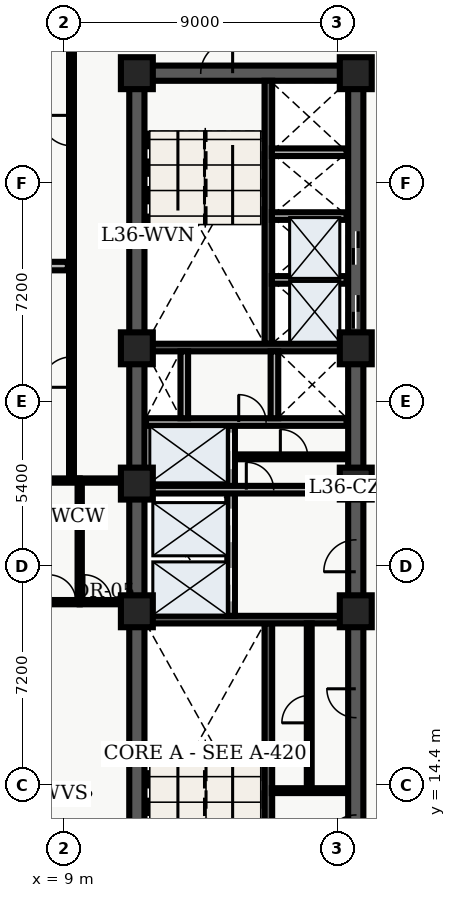
"""IFC4 building model, lengths in metres.
Left out: names, types, materials, properties, quantities, classifications, styles, units other than length and angle.
Written with IfcOpenShell. Run it as: python <this file> out.ifc"""

import sys

from ifc_helpers import new_model, entity, si_unit, converted_unit, direction, frame, origin_with_axes, origin_2d_with_axis, place, context, subcontext, project, spatial, polyline, rectangle, outline, extrude, element, fill, save


model = new_model("IFC4")
c1 = context("Model", 3, precision=1e-05, world=origin_with_axes(), true_north=direction((0.0, 1.0)))
c2 = subcontext(c1, "Body", "Model", "MODEL_VIEW")
j1 = project(units=[si_unit("LENGTHUNIT", "METRE"), converted_unit("PLANEANGLEUNIT", "DEGREE", entity("IfcPlaneAngleMeasure", 0.017), si_unit("PLANEANGLEUNIT", "RADIAN"), dimensions=[0, 0, 0, 0, 0, 0, 0])], contexts=[c1])
p1 = place(None, origin_with_axes())
s1 = spatial("IfcSite", under=j1, at=p1, CompositionType="ELEMENT")
p2 = place(p1, origin_with_axes())
s2 = spatial("IfcBuilding", under=s1, at=p2, CompositionType="ELEMENT")
p3 = place(p2, frame((0.0, 0.0, 148.5), z_axis=(0.0, 0.0, 1.0), x_axis=(1.0, 0.0, 0.0)))
s3 = spatial("IfcBuildingStorey", under=s2, at=p3, CompositionType="ELEMENT", Elevation=148.5)
p4 = place(p3, frame((11.4, 10.8, 0.0), z_axis=(0.0, 0.0, 1.0), x_axis=(0.0, 1.0, 0.0)))
e1 = element("IfcWall", 1, at=p4, inside=s3, PredefinedType="SHEAR", context=c2, shape_type="SweptSolid", body=[
    extrude(outline(polyline([(0.0, -0.25), (27.0, -0.25), (27.0, 0.25), (0.0, 0.25), (0.0, -0.25)])), origin_with_axes(), (0.0, 0.0, 1.0), 3.66),
])
p5 = place(p3, frame((11.4, 37.8, 0.0), z_axis=(0.0, 0.0, 1.0), x_axis=(1.0, 0.0, 0.0)))
e2 = element("IfcWall", 2, at=p5, inside=s3, PredefinedType="SHEAR", context=c2, shape_type="SweptSolid", body=[
    extrude(outline(polyline([(0.0, -0.25), (7.2, -0.25), (7.2, 0.25), (0.0, 0.25), (0.0, -0.25)])), origin_with_axes(), (0.0, 0.0, 1.0), 3.66),
])
p6 = place(p5, frame((2.625, 0.0, 0.0), z_axis=(0.0, 0.0, 1.0), x_axis=(1.0, 0.0, 0.0)))
e3 = element("IfcOpeningElement", 3, at=p6, cuts=e2, PredefinedType="OPENING", context=c2, shape_type="SweptSolid", body=[
    extrude(rectangle(XDim=1.05, YDim=0.52, at=origin_2d_with_axis()), origin_with_axes(), (0.0, 0.0, 1.0), 2.15),
])
p7 = place(p3, frame((18.6, 10.8, 0.0), z_axis=(0.0, 0.0, 1.0), x_axis=(0.0, 1.0, 0.0)))
e4 = element("IfcWall", 4, at=p7, inside=s3, PredefinedType="SHEAR", context=c2, shape_type="SweptSolid", body=[
    extrude(outline(polyline([(0.0, -0.25), (13.5, -0.25), (13.5, 0.25), (0.0, 0.25), (0.0, -0.25)])), origin_with_axes(), (0.0, 0.0, 1.0), 3.66),
])
p8 = place(p7, frame((11.125, 0.0, 0.0), z_axis=(0.0, 0.0, 1.0), x_axis=(1.0, 0.0, 0.0)))
e5 = element("IfcOpeningElement", 5, at=p8, cuts=e4, PredefinedType="OPENING", context=c2, shape_type="SweptSolid", body=[
    extrude(rectangle(XDim=1.05, YDim=0.52, at=origin_2d_with_axis()), origin_with_axes(), (0.0, 0.0, 1.0), 2.15),
])
p9 = place(p7, frame((2.125, 0.0, 0.0), z_axis=(0.0, 0.0, 1.0), x_axis=(1.0, 0.0, 0.0)))
e6 = element("IfcOpeningElement", 6, at=p9, cuts=e4, PredefinedType="OPENING", context=c2, shape_type="SweptSolid", body=[
    extrude(rectangle(XDim=0.95, YDim=0.52, at=origin_2d_with_axis()), origin_with_axes(), (0.0, 0.0, 1.0), 2.15),
])
p10 = place(p7, frame((6.275, 0.0, 0.0), z_axis=(0.0, 0.0, 1.0), x_axis=(1.0, 0.0, 0.0)))
e7 = element("IfcOpeningElement", 7, at=p10, cuts=e4, PredefinedType="OPENING", context=c2, shape_type="SweptSolid", body=[
    extrude(rectangle(XDim=0.95, YDim=0.52, at=origin_2d_with_axis()), origin_with_axes(), (0.0, 0.0, 1.0), 2.15),
])
p11 = place(p3, frame((18.6, 24.3, 0.0), z_axis=(0.0, 0.0, 1.0), x_axis=(0.0, 1.0, 0.0)))
e8 = element("IfcWall", 8, at=p11, inside=s3, PredefinedType="SHEAR", context=c2, shape_type="SweptSolid", body=[
    extrude(outline(polyline([(0.0, -0.25), (13.5, -0.25), (13.5, 0.25), (0.0, 0.25), (0.0, -0.25)])), origin_with_axes(), (0.0, 0.0, 1.0), 3.66),
])
p12 = place(p11, frame((5.65, 0.0, 0.0), z_axis=(0.0, 0.0, 1.0), x_axis=(1.0, 0.0, 0.0)))
e9 = element("IfcOpeningElement", 9, at=p12, cuts=e8, PredefinedType="OPENING", context=c2, shape_type="SweptSolid", body=[
    extrude(rectangle(XDim=1.1, YDim=0.52, at=origin_2d_with_axis()), origin_with_axes(), (0.0, 0.0, 1.0), 2.15),
])
p13 = place(p11, frame((7.75, 0.0, 0.0), z_axis=(0.0, 0.0, 1.0), x_axis=(1.0, 0.0, 0.0)))
e10 = element("IfcOpeningElement", 10, at=p13, cuts=e8, PredefinedType="OPENING", context=c2, shape_type="SweptSolid", body=[
    extrude(rectangle(XDim=1.1, YDim=0.52, at=origin_2d_with_axis()), origin_with_axes(), (0.0, 0.0, 1.0), 2.15),
])
p14 = place(p3, frame((15.725, 11.05, 0.0), z_axis=(0.0, 0.0, 1.0), x_axis=(0.0, 1.0, 0.0)))
e11 = element("IfcWall", 11, at=p14, inside=s3, PredefinedType="SHEAR", context=c2, shape_type="SweptSolid", body=[
    extrude(outline(polyline([(0.0, -0.125), (8.65, -0.125), (8.65, 0.125), (0.0, 0.125), (0.0, -0.125)])), origin_with_axes(), (0.0, 0.0, 1.0), 3.66),
])
p15 = place(p3, frame((11.65, 19.825, 0.0), z_axis=(0.0, 0.0, 1.0), x_axis=(1.0, 0.0, 0.0)))
e12 = element("IfcWall", 12, at=p15, inside=s3, PredefinedType="SHEAR", context=c2, shape_type="SweptSolid", body=[
    extrude(outline(polyline([(0.0, -0.125), (6.7, -0.125), (6.7, 0.125), (0.0, 0.125), (0.0, -0.125)])), origin_with_axes(), (0.0, 0.0, 1.0), 3.66),
])
p16 = place(p3, frame((15.725, 28.9, 0.0), z_axis=(0.0, 0.0, 1.0), x_axis=(0.0, 1.0, 0.0)))
e13 = element("IfcWall", 13, at=p16, inside=s3, PredefinedType="SHEAR", context=c2, shape_type="SweptSolid", body=[
    extrude(outline(polyline([(0.0, -0.125), (8.65, -0.125), (8.65, 0.125), (0.0, 0.125), (0.0, -0.125)])), origin_with_axes(), (0.0, 0.0, 1.0), 3.66),
])
p17 = place(p3, frame((11.65, 28.775, 0.0), z_axis=(0.0, 0.0, 1.0), x_axis=(1.0, 0.0, 0.0)))
e14 = element("IfcWall", 14, at=p17, inside=s3, PredefinedType="SHEAR", context=c2, shape_type="SweptSolid", body=[
    extrude(outline(polyline([(0.0, -0.125), (6.7, -0.125), (6.7, 0.125), (0.0, 0.125), (0.0, -0.125)])), origin_with_axes(), (0.0, 0.0, 1.0), 3.66),
])
p18 = place(p3, frame((14.5, 19.95, 0.0), z_axis=(0.0, 0.0, 1.0), x_axis=(0.0, 1.0, 0.0)))
e15 = element("IfcWall", 15, at=p18, inside=s3, PredefinedType="SOLIDWALL", context=c2, shape_type="SweptSolid", body=[
    extrude(outline(polyline([(0.0, -0.125), (6.25, -0.125), (6.25, 0.125), (0.0, 0.125), (0.0, -0.125)])), origin_with_axes(), (0.0, 0.0, 1.0), 2.7),
])
p19 = place(p18, frame((1.025, 0.0, 0.0), z_axis=(0.0, 0.0, 1.0), x_axis=(1.0, 0.0, 0.0)))
e16 = element("IfcOpeningElement", 16, at=p19, cuts=e15, PredefinedType="OPENING", context=c2, shape_type="SweptSolid", body=[
    extrude(rectangle(XDim=1.1, YDim=0.27, at=origin_2d_with_axis()), origin_with_axes(), (0.0, 0.0, 1.0), 2.15),
])
p20 = place(p18, frame((2.975, 0.0, 0.0), z_axis=(0.0, 0.0, 1.0), x_axis=(1.0, 0.0, 0.0)))
e17 = element("IfcOpeningElement", 17, at=p20, cuts=e15, PredefinedType="OPENING", context=c2, shape_type="SweptSolid", body=[
    extrude(rectangle(XDim=1.1, YDim=0.27, at=origin_2d_with_axis()), origin_with_axes(), (0.0, 0.0, 1.0), 2.15),
])
p21 = place(p18, frame((5.425, 0.0, 0.0), z_axis=(0.0, 0.0, 1.0), x_axis=(1.0, 0.0, 0.0)))
e18 = element("IfcOpeningElement", 18, at=p21, cuts=e15, PredefinedType="OPENING", context=c2, shape_type="SweptSolid", body=[
    extrude(rectangle(XDim=1.2, YDim=0.27, at=origin_2d_with_axis()), origin_with_axes(), (0.0, 0.0, 1.0), 2.15),
])
p22 = place(p3, frame((11.7, 24.1, 0.0), z_axis=(0.0, 0.0, 1.0), x_axis=(1.0, 0.0, 0.0)))
e19 = element("IfcWall", 19, at=p22, inside=s3, PredefinedType="SOLIDWALL", context=c2, shape_type="SweptSolid", body=[
    extrude(outline(polyline([(0.0, -0.125), (6.6, -0.125), (6.6, 0.125), (0.0, 0.125), (0.0, -0.125)])), origin_with_axes(), (0.0, 0.0, 1.0), 2.7),
])
p23 = place(p22, frame((3.75, 0.0, 0.0), z_axis=(0.0, 0.0, 1.0), x_axis=(1.0, 0.0, 0.0)))
e20 = element("IfcOpeningElement", 20, at=p23, cuts=e19, PredefinedType="OPENING", context=c2, shape_type="SweptSolid", body=[
    extrude(rectangle(XDim=0.9, YDim=0.27, at=origin_2d_with_axis()), origin_with_axes(), (0.0, 0.0, 1.0), 2.15),
])
p24 = place(p3, frame((11.7, 26.325, 0.0), z_axis=(0.0, 0.0, 1.0), x_axis=(1.0, 0.0, 0.0)))
e21 = element("IfcWall", 21, at=p24, inside=s3, PredefinedType="SOLIDWALL", context=c2, shape_type="SweptSolid", body=[
    extrude(outline(polyline([(0.0, -0.125), (6.6, -0.125), (6.6, 0.125), (0.0, 0.125), (0.0, -0.125)])), origin_with_axes(), (0.0, 0.0, 1.0), 2.7),
])
p25 = place(p24, frame((3.5, 0.0, 0.0), z_axis=(0.0, 0.0, 1.0), x_axis=(1.0, 0.0, 0.0)))
e22 = element("IfcOpeningElement", 22, at=p25, cuts=e21, PredefinedType="OPENING", context=c2, shape_type="SweptSolid", body=[
    extrude(rectangle(XDim=0.9, YDim=0.27, at=origin_2d_with_axis()), origin_with_axes(), (0.0, 0.0, 1.0), 2.15),
])
for number, where, z_axis, x_axis in (
    (23, (12.96, 26.45, 0.0), (0.0, 0.0, 1.0), (0.0, 1.0, 0.0)),
    (24, (15.925, 26.45, 0.0), (0.0, 0.0, 1.0), (0.0, 1.0, 0.0)),
):
    element("IfcWall", number, at=place(p3, frame(where, z_axis=z_axis, x_axis=x_axis)), inside=s3, PredefinedType="SOLIDWALL", context=c2, shape_type="SweptSolid", body=[
        extrude(outline(polyline([(0.0, -0.125), (2.2, -0.125), (2.2, 0.125), (0.0, 0.125), (0.0, -0.125)])), origin_with_axes(), (0.0, 0.0, 1.0), 2.7),
    ])
for number, where, z_axis, x_axis in (
    (25, (11.4, 20.1, 0.0), (0.0, 0.0, 1.0), (1.0, 0.0, 0.0)),
    (26, (11.4, 24.3, 0.0), (0.0, 0.0, 1.0), (1.0, 0.0, 0.0)),
    (27, (11.4, 28.75, 0.0), (0.0, 0.0, 1.0), (1.0, 0.0, 0.0)),
    (28, (11.4, 37.8, 0.0), (0.0, 0.0, 1.0), (1.0, 0.0, 0.0)),
    (29, (18.6, 20.1, 0.0), (0.0, 0.0, 1.0), (1.0, 0.0, 0.0)),
    (30, (18.6, 24.3, 0.0), (0.0, 0.0, 1.0), (1.0, 0.0, 0.0)),
    (31, (18.6, 28.75, 0.0), (0.0, 0.0, 1.0), (1.0, 0.0, 0.0)),
    (32, (18.6, 37.8, 0.0), (0.0, 0.0, 1.0), (1.0, 0.0, 0.0)),
):
    element("IfcColumn", number, at=place(p3, frame(where, z_axis=z_axis, x_axis=x_axis)), inside=s3, PredefinedType="COLUMN", context=c2, shape_type="SweptSolid", body=[
        extrude(rectangle(XDim=1.05, YDim=1.05, at=origin_2d_with_axis()), origin_with_axes(), (0.0, 0.0, 1.0), 3.9),
    ])
p26 = place(p3, frame((14.62, 25.18, 0.0), z_axis=(0.0, 0.0, 1.0), x_axis=(1.0, 0.0, 0.0)))
e33 = element("IfcWall", 33, at=p26, inside=s3, PredefinedType="PARTITIONING", context=c2, shape_type="SweptSolid", body=[
    extrude(outline(polyline([(0.0, -0.08), (3.68, -0.08), (3.68, 0.08), (0.0, 0.08), (0.0, -0.08)])), origin_with_axes(), (0.0, 0.0, 1.0), 2.7),
])
p27 = place(p26, frame((1.95, 0.0, 0.0), z_axis=(0.0, 0.0, 1.0), x_axis=(1.0, 0.0, 0.0)))
e34 = element("IfcOpeningElement", 34, at=p27, cuts=e33, PredefinedType="OPENING", context=c2, shape_type="SweptSolid", body=[
    extrude(rectangle(XDim=0.9, YDim=0.18, at=origin_2d_with_axis()), origin_with_axes(), (0.0, 0.0, 1.0), 2.15),
])
p28 = place(p3, frame((15.84, 14.2, 0.0), z_axis=(0.0, 0.0, 1.0), x_axis=(1.0, 0.0, 0.0)))
e35 = element("IfcWall", 35, at=p28, inside=s3, PredefinedType="PARTITIONING", context=c2, shape_type="SweptSolid", body=[
    extrude(outline(polyline([(0.0, -0.08), (2.46, -0.08), (2.46, 0.08), (0.0, 0.08), (0.0, -0.08)])), origin_with_axes(), (0.0, 0.0, 1.0), 2.7),
])
p29 = place(p3, frame((17.07, 14.28, 0.0), z_axis=(0.0, 0.0, 1.0), x_axis=(0.0, 1.0, 0.0)))
e36 = element("IfcWall", 36, at=p29, inside=s3, PredefinedType="PARTITIONING", context=c2, shape_type="SweptSolid", body=[
    extrude(outline(polyline([(0.0, -0.08), (5.42, -0.08), (5.42, 0.08), (0.0, 0.08), (0.0, -0.08)])), origin_with_axes(), (0.0, 0.0, 1.0), 2.7),
])
p30 = place(p29, frame((2.6, 0.0, 0.0), z_axis=(0.0, 0.0, 1.0), x_axis=(1.0, 0.0, 0.0)))
e37 = element("IfcOpeningElement", 37, at=p30, cuts=e36, PredefinedType="OPENING", context=c2, shape_type="SweptSolid", body=[
    extrude(rectangle(XDim=0.9, YDim=0.18, at=origin_2d_with_axis()), origin_with_axes(), (0.0, 0.0, 1.0), 2.15),
])
for number, where, z_axis, x_axis in (
    (38, (15.84, 31.0, 0.0), (0.0, 0.0, 1.0), (1.0, 0.0, 0.0)),
    (39, (15.84, 33.1, 0.0), (0.0, 0.0, 1.0), (1.0, 0.0, 0.0)),
    (40, (15.84, 35.2, 0.0), (0.0, 0.0, 1.0), (1.0, 0.0, 0.0)),
):
    element("IfcWall", number, at=place(p3, frame(where, z_axis=z_axis, x_axis=x_axis)), inside=s3, PredefinedType="SOLIDWALL", context=c2, shape_type="SweptSolid", body=[
        extrude(outline(polyline([(0.0, -0.125), (2.46, -0.125), (2.46, 0.125), (0.0, 0.125), (0.0, -0.125)])), origin_with_axes(), (0.0, 0.0, 1.0), 2.7),
    ])
p31 = place(p3, frame((9.52, 20.4, 0.0), z_axis=(0.0, 0.0, 1.0), x_axis=(0.0, 1.0, 0.0)))
e41 = element("IfcWall", 41, at=p31, inside=s3, PredefinedType="PARTITIONING", context=c2, shape_type="SweptSolid", body=[
    extrude(outline(polyline([(0.0, -0.07), (4.0, -0.07), (4.0, 0.07), (0.0, 0.07), (0.0, -0.07)])), origin_with_axes(), (0.0, 0.0, 1.0), 2.7),
])
p32 = place(p3, frame((9.52, 20.4, 0.0), z_axis=(0.0, 0.0, 1.0), x_axis=(1.0, 0.0, 0.0)))
e42 = element("IfcWall", 42, at=p32, inside=s3, PredefinedType="PARTITIONING", context=c2, shape_type="SweptSolid", body=[
    extrude(outline(polyline([(0.0, -0.07), (1.58, -0.07), (1.58, 0.07), (0.0, 0.07), (0.0, -0.07)])), origin_with_axes(), (0.0, 0.0, 1.0), 2.7),
])
p33 = place(p32, frame((0.59, 0.0, 0.0), z_axis=(0.0, 0.0, 1.0), x_axis=(1.0, 0.0, 0.0)))
e43 = element("IfcOpeningElement", 43, at=p33, cuts=e42, PredefinedType="OPENING", context=c2, shape_type="SweptSolid", body=[
    extrude(rectangle(XDim=0.9, YDim=0.16, at=origin_2d_with_axis()), origin_with_axes(), (0.0, 0.0, 1.0), 2.15),
])
p34 = place(p3, frame((9.52, 24.4, 0.0), z_axis=(0.0, 0.0, 1.0), x_axis=(1.0, 0.0, 0.0)))
e44 = element("IfcWall", 44, at=p34, inside=s3, PredefinedType="PARTITIONING", context=c2, shape_type="SweptSolid", body=[
    extrude(outline(polyline([(0.0, -0.07), (1.58, -0.07), (1.58, 0.07), (0.0, 0.07), (0.0, -0.07)])), origin_with_axes(), (0.0, 0.0, 1.0), 2.7),
])
p35 = place(p3, frame((9.25, 24.4, 0.0), z_axis=(0.0, 0.0, 1.0), x_axis=(0.0, 1.0, 0.0)))
e45 = element("IfcWall", 45, at=p35, inside=s3, PredefinedType="PARTITIONING", context=c2, shape_type="SweptSolid", body=[
    extrude(outline(polyline([(0.0, -0.08), (16.1, -0.08), (16.1, 0.08), (0.0, 0.08), (0.0, -0.08)])), origin_with_axes(), (0.0, 0.0, 1.0), 2.7),
])
p36 = place(p35, frame((3.567, 0.0, 0.0), z_axis=(0.0, 0.0, 1.0), x_axis=(1.0, 0.0, 0.0)))
e46 = element("IfcOpeningElement", 46, at=p36, cuts=e45, PredefinedType="OPENING", context=c2, shape_type="SweptSolid", body=[
    extrude(rectangle(XDim=1.0, YDim=0.18, at=origin_2d_with_axis()), origin_with_axes(), (0.0, 0.0, 1.0), 2.15),
])
p37 = place(p35, frame((11.512, 0.0, 0.0), z_axis=(0.0, 0.0, 1.0), x_axis=(1.0, 0.0, 0.0)))
e47 = element("IfcOpeningElement", 47, at=p37, cuts=e45, PredefinedType="OPENING", context=c2, shape_type="SweptSolid", body=[
    extrude(rectangle(XDim=1.0, YDim=0.18, at=origin_2d_with_axis()), origin_with_axes(), (0.0, 0.0, 1.0), 2.15),
])
p38 = place(p3, frame((0.335, 20.4, 0.0), z_axis=(0.0, 0.0, 1.0), x_axis=(1.0, 0.0, 0.0)))
e48 = element("IfcWall", 48, at=p38, inside=s3, PredefinedType="PARTITIONING", context=c2, shape_type="SweptSolid", body=[
    extrude(outline(polyline([(0.0, -0.07), (9.185, -0.07), (9.185, 0.07), (0.0, 0.07), (0.0, -0.07)])), origin_with_axes(), (0.0, 0.0, 1.0), 2.7),
])
p39 = place(p38, frame((8.615, 0.0, 0.0), z_axis=(0.0, 0.0, 1.0), x_axis=(1.0, 0.0, 0.0)))
e49 = element("IfcOpeningElement", 49, at=p39, cuts=e48, PredefinedType="OPENING", context=c2, shape_type="SweptSolid", body=[
    extrude(rectangle(XDim=0.9, YDim=0.16, at=origin_2d_with_axis()), origin_with_axes(), (0.0, 0.0, 1.0), 2.15),
])
p40 = place(p3, frame((0.335, 24.4, 0.0), z_axis=(0.0, 0.0, 1.0), x_axis=(1.0, 0.0, 0.0)))
e50 = element("IfcWall", 50, at=p40, inside=s3, PredefinedType="PARTITIONING", context=c2, shape_type="SweptSolid", body=[
    extrude(outline(polyline([(0.0, -0.07), (9.185, -0.07), (9.185, 0.07), (0.0, 0.07), (0.0, -0.07)])), origin_with_axes(), (0.0, 0.0, 1.0), 2.7),
])
p41 = place(p3, frame((0.335, 31.455, 0.0), z_axis=(0.0, 0.0, 1.0), x_axis=(1.0, 0.0, 0.0)))
e51 = element("IfcWall", 51, at=p41, inside=s3, PredefinedType="PARTITIONING", context=c2, shape_type="SweptSolid", body=[
    extrude(outline(polyline([(0.0, -0.14), (8.795, -0.14), (8.795, 0.14), (0.0, 0.14), (0.0, -0.14)])), origin_with_axes(), (0.0, 0.0, 1.0), 2.7),
])
p42 = place(p11, frame((5.65, 0.0, 0.0), z_axis=(0.0, 0.0, 1.0), x_axis=(1.0, 0.0, 0.0)))
e52 = element("IfcDoor", 52, at=p42, inside=s3, OperationType="SLIDING_TO_LEFT", PredefinedType="DOOR", context=c2, shape_type="SweptSolid", body=[
    extrude(rectangle(XDim=1.1, YDim=0.09, at=origin_2d_with_axis()), origin_with_axes(), (0.0, 0.0, 1.0), 2.15),
])
fill(e9, e52)
p43 = place(p11, frame((7.75, 0.0, 0.0), z_axis=(0.0, 0.0, 1.0), x_axis=(1.0, 0.0, 0.0)))
e53 = element("IfcDoor", 53, at=p43, inside=s3, OperationType="SLIDING_TO_RIGHT", PredefinedType="DOOR", context=c2, shape_type="SweptSolid", body=[
    extrude(rectangle(XDim=1.1, YDim=0.09, at=origin_2d_with_axis()), origin_with_axes(), (0.0, 0.0, 1.0), 2.15),
])
fill(e10, e53)
p44 = place(p18, frame((1.025, 0.0, 0.0), z_axis=(0.0, 0.0, 1.0), x_axis=(1.0, 0.0, 0.0)))
e54 = element("IfcDoor", 54, at=p44, inside=s3, OperationType="SLIDING_TO_LEFT", PredefinedType="DOOR", context=c2, shape_type="SweptSolid", body=[
    extrude(rectangle(XDim=1.1, YDim=0.09, at=origin_2d_with_axis()), origin_with_axes(), (0.0, 0.0, 1.0), 2.15),
])
fill(e16, e54)
p45 = place(p18, frame((2.975, 0.0, 0.0), z_axis=(0.0, 0.0, 1.0), x_axis=(1.0, 0.0, 0.0)))
e55 = element("IfcDoor", 55, at=p45, inside=s3, OperationType="SLIDING_TO_RIGHT", PredefinedType="DOOR", context=c2, shape_type="SweptSolid", body=[
    extrude(rectangle(XDim=1.1, YDim=0.09, at=origin_2d_with_axis()), origin_with_axes(), (0.0, 0.0, 1.0), 2.15),
])
fill(e17, e55)
p46 = place(p18, frame((5.425, 0.0, 0.0), z_axis=(0.0, 0.0, 1.0), x_axis=(1.0, 0.0, 0.0)))
e56 = element("IfcDoor", 56, at=p46, inside=s3, OperationType="DOUBLE_DOOR_SLIDING", PredefinedType="DOOR", context=c2, shape_type="SweptSolid", body=[
    extrude(rectangle(XDim=1.2, YDim=0.09, at=origin_2d_with_axis()), origin_with_axes(), (0.0, 0.0, 1.0), 2.15),
])
fill(e18, e56)
p47 = place(p5, frame((2.625, 0.0, 0.0), z_axis=(0.0, 0.0, 1.0), x_axis=(1.0, 0.0, 0.0)))
e57 = element("IfcDoor", 57, at=p47, inside=s3, OperationType="SINGLE_SWING_RIGHT", PredefinedType="DOOR", context=c2, shape_type="SweptSolid", body=[
    extrude(rectangle(XDim=1.05, YDim=0.09, at=origin_2d_with_axis()), origin_with_axes(), (0.0, 0.0, 1.0), 2.15),
])
fill(e3, e57)
p48 = place(p7, frame((11.125, 0.0, 0.0), z_axis=(0.0, 0.0, 1.0), x_axis=(1.0, 0.0, 0.0)))
e58 = element("IfcDoor", 58, at=p48, inside=s3, OperationType="SINGLE_SWING_LEFT", PredefinedType="DOOR", context=c2, shape_type="SweptSolid", body=[
    extrude(rectangle(XDim=1.05, YDim=0.09, at=origin_2d_with_axis()), origin_with_axes(), (0.0, 0.0, 1.0), 2.15),
])
fill(e5, e58)
p49 = place(p24, frame((3.5, 0.0, 0.0), z_axis=(0.0, 0.0, 1.0), x_axis=(1.0, 0.0, 0.0)))
e59 = element("IfcDoor", 59, at=p49, inside=s3, OperationType="SINGLE_SWING_LEFT", PredefinedType="DOOR", context=c2, shape_type="SweptSolid", body=[
    extrude(rectangle(XDim=0.9, YDim=0.09, at=origin_2d_with_axis()), origin_with_axes(), (0.0, 0.0, 1.0), 2.15),
])
fill(e22, e59)
p50 = place(p22, frame((3.75, 0.0, 0.0), z_axis=(0.0, 0.0, 1.0), x_axis=(1.0, 0.0, 0.0)))
e60 = element("IfcDoor", 60, at=p50, inside=s3, OperationType="SINGLE_SWING_LEFT", PredefinedType="DOOR", context=c2, shape_type="SweptSolid", body=[
    extrude(rectangle(XDim=0.9, YDim=0.09, at=origin_2d_with_axis()), origin_with_axes(), (0.0, 0.0, 1.0), 2.15),
])
fill(e20, e60)
p51 = place(p26, frame((1.95, 0.0, 0.0), z_axis=(0.0, 0.0, 1.0), x_axis=(1.0, 0.0, 0.0)))
e61 = element("IfcDoor", 61, at=p51, inside=s3, OperationType="SINGLE_SWING_LEFT", PredefinedType="DOOR", context=c2, shape_type="SweptSolid", body=[
    extrude(rectangle(XDim=0.9, YDim=0.09, at=origin_2d_with_axis()), origin_with_axes(), (0.0, 0.0, 1.0), 2.15),
])
fill(e34, e61)
p52 = place(p7, frame((2.125, 0.0, 0.0), z_axis=(0.0, 0.0, 1.0), x_axis=(1.0, 0.0, 0.0)))
e62 = element("IfcDoor", 62, at=p52, inside=s3, OperationType="SINGLE_SWING_LEFT", PredefinedType="DOOR", context=c2, shape_type="SweptSolid", body=[
    extrude(rectangle(XDim=0.95, YDim=0.09, at=origin_2d_with_axis()), origin_with_axes(), (0.0, 0.0, 1.0), 2.15),
])
fill(e6, e62)
p53 = place(p29, frame((2.6, 0.0, 0.0), z_axis=(0.0, 0.0, 1.0), x_axis=(1.0, 0.0, 0.0)))
e63 = element("IfcDoor", 63, at=p53, inside=s3, OperationType="SINGLE_SWING_LEFT", PredefinedType="DOOR", context=c2, shape_type="SweptSolid", body=[
    extrude(rectangle(XDim=0.9, YDim=0.09, at=origin_2d_with_axis()), origin_with_axes(), (0.0, 0.0, 1.0), 2.15),
])
fill(e37, e63)
p54 = place(p7, frame((6.275, 0.0, 0.0), z_axis=(0.0, 0.0, 1.0), x_axis=(1.0, 0.0, 0.0)))
e64 = element("IfcDoor", 64, at=p54, inside=s3, OperationType="SINGLE_SWING_RIGHT", PredefinedType="DOOR", context=c2, shape_type="SweptSolid", body=[
    extrude(rectangle(XDim=0.95, YDim=0.09, at=origin_2d_with_axis()), origin_with_axes(), (0.0, 0.0, 1.0), 2.15),
])
fill(e7, e64)
p55 = place(p32, frame((0.59, 0.0, 0.0), z_axis=(0.0, 0.0, 1.0), x_axis=(1.0, 0.0, 0.0)))
e65 = element("IfcDoor", 65, at=p55, inside=s3, OperationType="SINGLE_SWING_LEFT", PredefinedType="DOOR", context=c2, shape_type="SweptSolid", body=[
    extrude(rectangle(XDim=0.9, YDim=0.084, at=origin_2d_with_axis()), origin_with_axes(), (0.0, 0.0, 1.0), 2.15),
])
fill(e43, e65)
p56 = place(p38, frame((8.615, 0.0, 0.0), z_axis=(0.0, 0.0, 1.0), x_axis=(1.0, 0.0, 0.0)))
e66 = element("IfcDoor", 66, at=p56, inside=s3, OperationType="SINGLE_SWING_LEFT", PredefinedType="DOOR", context=c2, shape_type="SweptSolid", body=[
    extrude(rectangle(XDim=0.9, YDim=0.084, at=origin_2d_with_axis()), origin_with_axes(), (0.0, 0.0, 1.0), 2.15),
])
fill(e49, e66)
p57 = place(p35, frame((3.567, 0.0, 0.0), z_axis=(0.0, 0.0, 1.0), x_axis=(1.0, 0.0, 0.0)))
e67 = element("IfcDoor", 67, at=p57, inside=s3, OperationType="SINGLE_SWING_LEFT", PredefinedType="DOOR", context=c2, shape_type="SweptSolid", body=[
    extrude(rectangle(XDim=1.0, YDim=0.09, at=origin_2d_with_axis()), origin_with_axes(), (0.0, 0.0, 1.0), 2.15),
])
fill(e46, e67)
p58 = place(p35, frame((11.512, 0.0, 0.0), z_axis=(0.0, 0.0, 1.0), x_axis=(1.0, 0.0, 0.0)))
e68 = element("IfcDoor", 68, at=p58, inside=s3, OperationType="SINGLE_SWING_RIGHT", PredefinedType="DOOR", context=c2, shape_type="SweptSolid", body=[
    extrude(rectangle(XDim=1.0, YDim=0.09, at=origin_2d_with_axis()), origin_with_axes(), (0.0, 0.0, 1.0), 2.15),
])
fill(e47, e68)
save(model, sys.argv[1])
